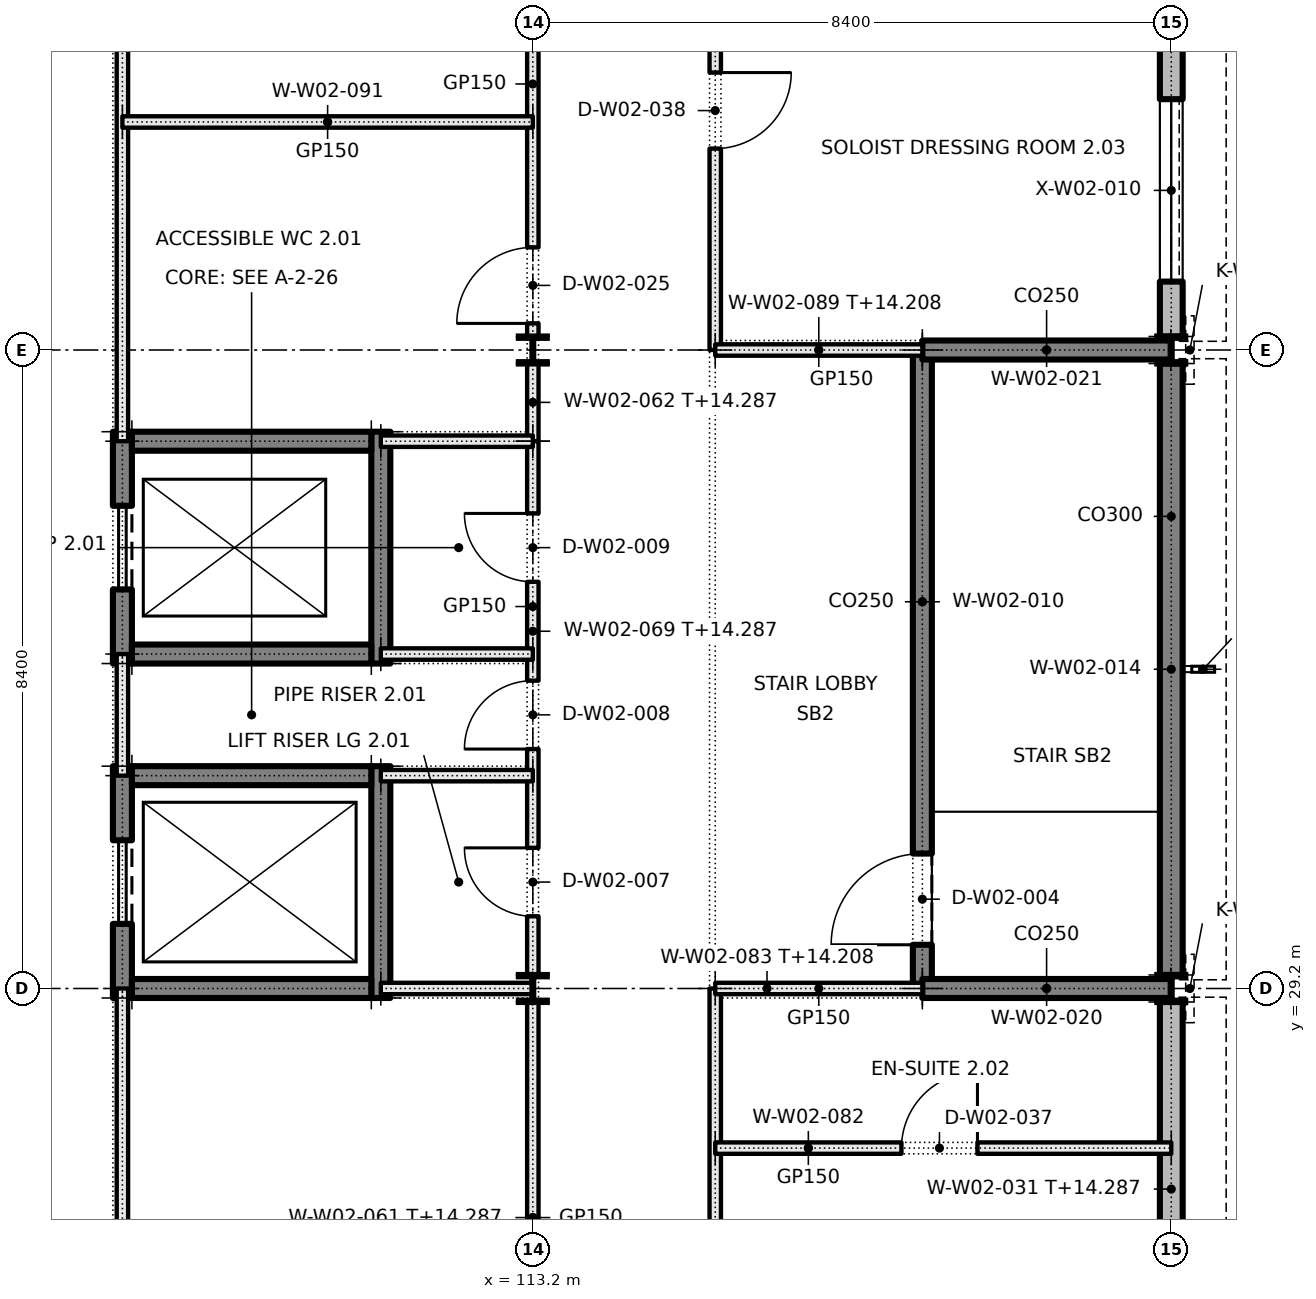
"""IFC4 building model, lengths in metres.
Left out: names, types, materials, properties, quantities, classifications, styles, units other than length and angle.
Written with IfcOpenShell. Run it as: python <this file> out.ifc"""

import sys

from ifc_helpers import new_model, si_unit, direction, frame, frame_2d, origin, origin_2d, place, context, subcontext, project, spatial, rectangle, i_section, extrude, element, fill, save


model = new_model("IFC4")
c1 = context("Model", 3, precision=1e-05, world=origin(), true_north=direction((0.0, 1.0)))
c2 = subcontext(c1, "Body", "Model", "MODEL_VIEW")
j1 = project(units=[si_unit("LENGTHUNIT", "METRE"), si_unit("PLANEANGLEUNIT", "RADIAN")], contexts=[c1])
p1 = place(None, origin())
s1 = spatial("IfcSite", under=j1, at=p1, CompositionType="ELEMENT")
p2 = place(p1, origin())
s2 = spatial("IfcBuilding", under=s1, at=p2, CompositionType="ELEMENT")
p3 = place(p2, frame((0.0, 0.0, 10.2)))
s3 = spatial("IfcBuildingStorey", under=s2, at=p3, CompositionType="ELEMENT", Elevation=10.2)
p4 = place(p3, frame((107.8, 29.075, 0.0), z_axis=(0.0, 0.0, 1.0), x_axis=(0.0, 1.0, 0.0)))
e1 = element("IfcWall", 1, at=p4, inside=s3, PredefinedType="SOLIDWALL", context=c2, shape_type="SweptSolid", body=[
    extrude(rectangle(XDim=3.05, YDim=0.25, at=frame_2d((1.525, 0.0))), origin(), (0.0, 0.0, 1.0), 4.8),
])
p5 = place(p4, frame((0.975, 0.0, 0.0)))
e2 = element("IfcOpeningElement", 2, at=p5, cuts=e1, PredefinedType="OPENING", context=c2, shape_type="SweptSolid", body=[
    extrude(rectangle(XDim=1.1, YDim=2.1, at=frame_2d((0.55, 1.05))), frame((0.0, 0.135, 0.0), z_axis=(0.0, -1.0, 0.0), x_axis=(1.0, 0.0, 0.0)), (0.0, 0.0, 1.0), 0.27),
])
p6 = place(p3, frame((111.2, 29.075, 0.0), z_axis=(0.0, 0.0, 1.0), x_axis=(0.0, 1.0, 0.0)))
e3 = element("IfcWall", 3, at=p6, inside=s3, PredefinedType="SOLIDWALL", context=c2, shape_type="SweptSolid", body=[
    extrude(rectangle(XDim=3.05, YDim=0.25, at=frame_2d((1.525, 0.0))), origin(), (0.0, 0.0, 1.0), 4.8),
])
for number, where, z_axis, x_axis in (
    (4, (107.925, 29.2, 0.0), (0.0, 0.0, 1.0), (1.0, 0.0, 0.0)),
    (5, (107.925, 32.0, 0.0), (0.0, 0.0, 1.0), (1.0, 0.0, 0.0)),
):
    element("IfcWall", number, at=place(p3, frame(where, z_axis=z_axis, x_axis=x_axis)), inside=s3, PredefinedType="SOLIDWALL", context=c2, shape_type="SweptSolid", body=[
        extrude(rectangle(XDim=3.15, YDim=0.25, at=frame_2d((1.575, 0.0))), origin(), (0.0, 0.0, 1.0), 4.8),
    ])
p7 = place(p3, frame((107.8, 33.475, 0.0), z_axis=(0.0, 0.0, 1.0), x_axis=(0.0, 1.0, 0.0)))
e6 = element("IfcWall", 6, at=p7, inside=s3, PredefinedType="SOLIDWALL", context=c2, shape_type="SweptSolid", body=[
    extrude(rectangle(XDim=3.05, YDim=0.25, at=frame_2d((1.525, 0.0))), origin(), (0.0, 0.0, 1.0), 4.8),
])
p8 = place(p7, frame((0.975, 0.0, 0.0)))
e7 = element("IfcOpeningElement", 7, at=p8, cuts=e6, PredefinedType="OPENING", context=c2, shape_type="SweptSolid", body=[
    extrude(rectangle(XDim=1.1, YDim=2.1, at=frame_2d((0.55, 1.05))), frame((0.0, 0.135, 0.0), z_axis=(0.0, -1.0, 0.0), x_axis=(1.0, 0.0, 0.0)), (0.0, 0.0, 1.0), 0.27),
])
p9 = place(p3, frame((111.2, 33.475, 0.0), z_axis=(0.0, 0.0, 1.0), x_axis=(0.0, 1.0, 0.0)))
e8 = element("IfcWall", 8, at=p9, inside=s3, PredefinedType="SOLIDWALL", context=c2, shape_type="SweptSolid", body=[
    extrude(rectangle(XDim=3.05, YDim=0.25, at=frame_2d((1.525, 0.0))), origin(), (0.0, 0.0, 1.0), 4.8),
])
for number, where, z_axis, x_axis in (
    (9, (107.925, 33.6, 0.0), (0.0, 0.0, 1.0), (1.0, 0.0, 0.0)),
    (10, (107.925, 36.4, 0.0), (0.0, 0.0, 1.0), (1.0, 0.0, 0.0)),
):
    element("IfcWall", number, at=place(p3, frame(where, z_axis=z_axis, x_axis=x_axis)), inside=s3, PredefinedType="SOLIDWALL", context=c2, shape_type="SweptSolid", body=[
        extrude(rectangle(XDim=3.15, YDim=0.25, at=frame_2d((1.575, 0.0))), origin(), (0.0, 0.0, 1.0), 4.8),
    ])
for number, where, z_axis, x_axis in (
    (11, (113.2, 29.2, 0.0), (0.0, 0.0, 1.0), (1.0, 0.0, 0.0)),
    (12, (113.2, 37.6, 0.0), (0.0, 0.0, 1.0), (1.0, 0.0, 0.0)),
    (13, (121.6, 29.2, 0.0), (0.0, 0.0, 1.0), (1.0, 0.0, 0.0)),
    (14, (121.6, 37.6, 0.0), (0.0, 0.0, 1.0), (1.0, 0.0, 0.0)),
):
    element("IfcColumn", number, at=place(p3, frame(where, z_axis=z_axis, x_axis=x_axis)), inside=s3, PredefinedType="COLUMN", context=c2, shape_type="SweptSolid", body=[
        extrude(i_section(OverallWidth=0.368, OverallDepth=0.356, WebThickness=0.011, FlangeThickness=0.018, FilletRadius=0.015, at=origin_2d()), origin(), (0.0, 0.0, 1.0), 4.8),
    ])
p10 = place(p3, frame((118.325, 29.2, 0.0), z_axis=(0.0, 0.0, 1.0), x_axis=(0.0, 1.0, 0.0)))
e15 = element("IfcWall", 15, at=p10, inside=s3, PredefinedType="SHEAR", context=c2, shape_type="SweptSolid", body=[
    extrude(rectangle(XDim=8.4, YDim=0.25, at=frame_2d((4.2, 0.0))), origin(), (0.0, 0.0, 1.0), 4.8),
])
p11 = place(p10, frame((0.575, 0.0, 0.0)))
e16 = element("IfcOpeningElement", 16, at=p11, cuts=e15, PredefinedType="OPENING", context=c2, shape_type="SweptSolid", body=[
    extrude(rectangle(XDim=1.2, YDim=2.1, at=frame_2d((0.6, 1.05))), frame((0.0, 0.135, 0.0), z_axis=(0.0, -1.0, 0.0), x_axis=(1.0, 0.0, 0.0)), (0.0, 0.0, 1.0), 0.27),
])
p12 = place(p3, frame((121.6, 29.378, 0.0), z_axis=(0.0, 0.0, 1.0), x_axis=(0.0, 1.0, 0.0)))
e17 = element("IfcWall", 17, at=p12, inside=s3, PredefinedType="SHEAR", context=c2, shape_type="SweptSolid", body=[
    extrude(rectangle(XDim=8.044, YDim=0.3, at=frame_2d((4.022, 0.0))), origin(), (0.0, 0.0, 1.0), 4.8),
])
for number, where, z_axis, x_axis in (
    (18, (118.325, 29.2, 0.0), (0.0, 0.0, 1.0), (1.0, 0.0, 0.0)),
    (19, (118.325, 37.6, 0.0), (0.0, 0.0, 1.0), (1.0, 0.0, 0.0)),
):
    element("IfcWall", number, at=place(p3, frame(where, z_axis=z_axis, x_axis=x_axis)), inside=s3, PredefinedType="SHEAR", context=c2, shape_type="SweptSolid", body=[
        extrude(rectangle(XDim=3.27, YDim=0.25, at=frame_2d((1.635, 0.0))), origin(), (0.0, 0.0, 1.0), 4.8),
    ])
p13 = place(p3, frame((121.6, 20.978, 0.0), z_axis=(0.0, 0.0, 1.0), x_axis=(0.0, 1.0, 0.0)))
e20 = element("IfcWall", 20, at=p13, inside=s3, PredefinedType="SOLIDWALL", context=c2, shape_type="SweptSolid", body=[
    extrude(rectangle(XDim=8.044, YDim=0.3, at=frame_2d((4.022, 0.0))), origin(), (0.0, 0.0, 1.0), 4.087),
])
p14 = place(p13, frame((0.722, 0.0, 0.95)))
e21 = element("IfcOpeningElement", 21, at=p14, cuts=e20, PredefinedType="OPENING", context=c2, shape_type="SweptSolid", body=[
    extrude(rectangle(XDim=2.4, YDim=1.8, at=frame_2d((1.2, 0.9))), frame((0.0, 0.16, 0.0), z_axis=(0.0, -1.0, 0.0), x_axis=(1.0, 0.0, 0.0)), (0.0, 0.0, 1.0), 0.32),
])
p15 = place(p3, frame((121.6, 37.778, 0.0), z_axis=(0.0, 0.0, 1.0), x_axis=(0.0, 1.0, 0.0)))
e22 = element("IfcWall", 22, at=p15, inside=s3, PredefinedType="SOLIDWALL", context=c2, shape_type="SweptSolid", body=[
    extrude(rectangle(XDim=8.044, YDim=0.3, at=frame_2d((4.022, 0.0))), origin(), (0.0, 0.0, 1.0), 4.087),
])
p16 = place(p15, frame((0.722, 0.0, 0.95)))
e23 = element("IfcOpeningElement", 23, at=p16, cuts=e22, PredefinedType="OPENING", context=c2, shape_type="SweptSolid", body=[
    extrude(rectangle(XDim=2.4, YDim=1.8, at=frame_2d((1.2, 0.9))), frame((0.0, 0.16, 0.0), z_axis=(0.0, -1.0, 0.0), x_axis=(1.0, 0.0, 0.0)), (0.0, 0.0, 1.0), 0.32),
])
p17 = place(p3, frame((107.8, 4.0, 0.0), z_axis=(0.0, 0.0, 1.0), x_axis=(0.0, 1.0, 0.0)))
e24 = element("IfcWall", 24, at=p17, inside=s3, PredefinedType="PARTITIONING", context=c2, shape_type="SweptSolid", body=[
    extrude(rectangle(XDim=25.2, YDim=0.15, at=frame_2d((12.6, 0.0))), origin(), (0.0, 0.0, 1.0), 4.8),
])
p18 = place(p3, frame((107.8, 36.4, 0.0), z_axis=(0.0, 0.0, 1.0), x_axis=(0.0, 1.0, 0.0)))
e25 = element("IfcWall", 25, at=p18, inside=s3, PredefinedType="PARTITIONING", context=c2, shape_type="SweptSolid", body=[
    extrude(rectangle(XDim=42.0, YDim=0.15, at=frame_2d((21.0, 0.0))), origin(), (0.0, 0.0, 1.0), 4.8),
])
p19 = place(p3, frame((107.8, 32.0, 0.0), z_axis=(0.0, 0.0, 1.0), x_axis=(0.0, 1.0, 0.0)))
e26 = element("IfcWall", 26, at=p19, inside=s3, PredefinedType="PARTITIONING", context=c2, shape_type="SweptSolid", body=[
    extrude(rectangle(XDim=1.6, YDim=0.15, at=frame_2d((0.8, 0.0))), origin(), (0.0, 0.0, 1.0), 4.8),
])
p20 = place(p3, frame((113.2, 20.978, 0.0), z_axis=(0.0, 0.0, 1.0), x_axis=(0.0, 1.0, 0.0)))
e27 = element("IfcWall", 27, at=p20, inside=s3, PredefinedType="PARTITIONING", context=c2, shape_type="SweptSolid", body=[
    extrude(rectangle(XDim=8.044, YDim=0.15, at=frame_2d((4.022, 0.0))), origin(), (0.0, 0.0, 1.0), 4.087),
])
p21 = place(p20, frame((1.372, 0.0, 0.0)))
e28 = element("IfcOpeningElement", 28, at=p21, cuts=e27, PredefinedType="OPENING", context=c2, shape_type="SweptSolid", body=[
    extrude(rectangle(XDim=1.0, YDim=2.1, at=frame_2d((0.5, 1.05))), frame((0.0, 0.085, 0.0), z_axis=(0.0, -1.0, 0.0), x_axis=(1.0, 0.0, 0.0)), (0.0, 0.0, 1.0), 0.17),
])
p22 = place(p3, frame((113.2, 36.4, 0.0), z_axis=(0.0, 0.0, 1.0), x_axis=(0.0, 1.0, 0.0)))
e29 = element("IfcWall", 29, at=p22, inside=s3, PredefinedType="PARTITIONING", context=c2, shape_type="SweptSolid", body=[
    extrude(rectangle(XDim=1.022, YDim=0.15, at=frame_2d((0.511, 0.0))), origin(), (0.0, 0.0, 1.0), 4.087),
])
p23 = place(p3, frame((113.2, 37.778, 0.0), z_axis=(0.0, 0.0, 1.0), x_axis=(0.0, 1.0, 0.0)))
e30 = element("IfcWall", 30, at=p23, inside=s3, PredefinedType="PARTITIONING", context=c2, shape_type="SweptSolid", body=[
    extrude(rectangle(XDim=8.044, YDim=0.15, at=frame_2d((4.022, 0.0))), origin(), (0.0, 0.0, 1.0), 4.087),
])
p24 = place(p23, frame((0.172, 0.0, 0.0)))
e31 = element("IfcOpeningElement", 31, at=p24, cuts=e30, PredefinedType="OPENING", context=c2, shape_type="SweptSolid", body=[
    extrude(rectangle(XDim=1.0, YDim=2.1, at=frame_2d((0.5, 1.05))), frame((0.0, 0.085, 0.0), z_axis=(0.0, -1.0, 0.0), x_axis=(1.0, 0.0, 0.0)), (0.0, 0.0, 1.0), 0.17),
])
p25 = place(p23, frame((5.472, 0.0, 0.0)))
e32 = element("IfcOpeningElement", 32, at=p25, cuts=e30, PredefinedType="OPENING", context=c2, shape_type="SweptSolid", body=[
    extrude(rectangle(XDim=1.0, YDim=2.1, at=frame_2d((0.5, 1.05))), frame((0.0, 0.085, 0.0), z_axis=(0.0, -1.0, 0.0), x_axis=(1.0, 0.0, 0.0)), (0.0, 0.0, 1.0), 0.17),
])
p26 = place(p3, frame((113.2, 29.378, 0.0), z_axis=(0.0, 0.0, 1.0), x_axis=(0.0, 1.0, 0.0)))
e33 = element("IfcWall", 33, at=p26, inside=s3, PredefinedType="PARTITIONING", context=c2, shape_type="SweptSolid", body=[
    extrude(rectangle(XDim=7.022, YDim=0.15, at=frame_2d((3.511, 0.0))), origin(), (0.0, 0.0, 1.0), 4.087),
])
p27 = place(p26, frame((0.772, 0.0, 0.0)))
e34 = element("IfcOpeningElement", 34, at=p27, cuts=e33, PredefinedType="OPENING", context=c2, shape_type="SweptSolid", body=[
    extrude(rectangle(XDim=0.9, YDim=2.1, at=frame_2d((0.45, 1.05))), frame((0.0, 0.085, 0.0), z_axis=(0.0, -1.0, 0.0), x_axis=(1.0, 0.0, 0.0)), (0.0, 0.0, 1.0), 0.17),
])
p28 = place(p26, frame((2.972, 0.0, 0.0)))
e35 = element("IfcOpeningElement", 35, at=p28, cuts=e33, PredefinedType="OPENING", context=c2, shape_type="SweptSolid", body=[
    extrude(rectangle(XDim=0.9, YDim=2.1, at=frame_2d((0.45, 1.05))), frame((0.0, 0.085, 0.0), z_axis=(0.0, -1.0, 0.0), x_axis=(1.0, 0.0, 0.0)), (0.0, 0.0, 1.0), 0.17),
])
p29 = place(p26, frame((5.172, 0.0, 0.0)))
e36 = element("IfcOpeningElement", 36, at=p29, cuts=e33, PredefinedType="OPENING", context=c2, shape_type="SweptSolid", body=[
    extrude(rectangle(XDim=0.9, YDim=2.1, at=frame_2d((0.45, 1.05))), frame((0.0, 0.085, 0.0), z_axis=(0.0, -1.0, 0.0), x_axis=(1.0, 0.0, 0.0)), (0.0, 0.0, 1.0), 0.17),
])
p30 = place(p3, frame((115.6, 12.4, 0.0), z_axis=(0.0, 0.0, 1.0), x_axis=(0.0, 1.0, 0.0)))
e37 = element("IfcWall", 37, at=p30, inside=s3, PredefinedType="PARTITIONING", context=c2, shape_type="SweptSolid", body=[
    extrude(rectangle(XDim=16.8, YDim=0.15, at=frame_2d((8.4, 0.0))), origin(), (0.0, 0.0, 1.0), 4.8),
])
p31 = place(p30, frame((2.65, 0.0, 0.0)))
e38 = element("IfcOpeningElement", 38, at=p31, cuts=e37, PredefinedType="OPENING", context=c2, shape_type="SweptSolid", body=[
    extrude(rectangle(XDim=1.0, YDim=2.1, at=frame_2d((0.5, 1.05))), frame((0.0, 0.085, 0.0), z_axis=(0.0, -1.0, 0.0), x_axis=(1.0, 0.0, 0.0)), (0.0, 0.0, 1.0), 0.17),
])
p32 = place(p30, frame((11.05, 0.0, 0.0)))
e39 = element("IfcOpeningElement", 39, at=p32, cuts=e37, PredefinedType="OPENING", context=c2, shape_type="SweptSolid", body=[
    extrude(rectangle(XDim=1.0, YDim=2.1, at=frame_2d((0.5, 1.05))), frame((0.0, 0.085, 0.0), z_axis=(0.0, -1.0, 0.0), x_axis=(1.0, 0.0, 0.0)), (0.0, 0.0, 1.0), 0.17),
])
p33 = place(p3, frame((115.6, 37.6, 0.0), z_axis=(0.0, 0.0, 1.0), x_axis=(0.0, 1.0, 0.0)))
e40 = element("IfcWall", 40, at=p33, inside=s3, PredefinedType="PARTITIONING", context=c2, shape_type="SweptSolid", body=[
    extrude(rectangle(XDim=21.0, YDim=0.15, at=frame_2d((10.5, 0.0))), origin(), (0.0, 0.0, 1.0), 4.8),
])
p34 = place(p33, frame((2.65, 0.0, 0.0)))
e41 = element("IfcOpeningElement", 41, at=p34, cuts=e40, PredefinedType="OPENING", context=c2, shape_type="SweptSolid", body=[
    extrude(rectangle(XDim=1.0, YDim=2.1, at=frame_2d((0.5, 1.05))), frame((0.0, 0.085, 0.0), z_axis=(0.0, -1.0, 0.0), x_axis=(1.0, 0.0, 0.0)), (0.0, 0.0, 1.0), 0.17),
])
p35 = place(p33, frame((11.05, 0.0, 0.0)))
e42 = element("IfcOpeningElement", 42, at=p35, cuts=e40, PredefinedType="OPENING", context=c2, shape_type="SweptSolid", body=[
    extrude(rectangle(XDim=1.0, YDim=2.1, at=frame_2d((0.5, 1.05))), frame((0.0, 0.085, 0.0), z_axis=(0.0, -1.0, 0.0), x_axis=(1.0, 0.0, 0.0)), (0.0, 0.0, 1.0), 0.17),
])
p36 = place(p33, frame((18.35, 0.0, 0.0)))
e43 = element("IfcOpeningElement", 43, at=p36, cuts=e40, PredefinedType="OPENING", context=c2, shape_type="SweptSolid", body=[
    extrude(rectangle(XDim=1.0, YDim=2.1, at=frame_2d((0.5, 1.05))), frame((0.0, 0.085, 0.0), z_axis=(0.0, -1.0, 0.0), x_axis=(1.0, 0.0, 0.0)), (0.0, 0.0, 1.0), 0.17),
])
p37 = place(p3, frame((115.6, 27.1, 0.0), z_axis=(0.0, 0.0, 1.0), x_axis=(1.0, 0.0, 0.0)))
e44 = element("IfcWall", 44, at=p37, inside=s3, PredefinedType="PARTITIONING", context=c2, shape_type="SweptSolid", body=[
    extrude(rectangle(XDim=6.0, YDim=0.15, at=frame_2d((3.0, 0.0))), origin(), (0.0, 0.0, 1.0), 4.8),
])
p38 = place(p37, frame((2.45, 0.0, 0.0)))
e45 = element("IfcOpeningElement", 45, at=p38, cuts=e44, PredefinedType="OPENING", context=c2, shape_type="SweptSolid", body=[
    extrude(rectangle(XDim=1.0, YDim=2.1, at=frame_2d((0.5, 1.05))), frame((0.0, 0.085, 0.0), z_axis=(0.0, -1.0, 0.0), x_axis=(1.0, 0.0, 0.0)), (0.0, 0.0, 1.0), 0.17),
])
p39 = place(p3, frame((115.6, 29.2, 0.0), z_axis=(0.0, 0.0, 1.0), x_axis=(1.0, 0.0, 0.0)))
e46 = element("IfcWall", 46, at=p39, inside=s3, PredefinedType="PARTITIONING", context=c2, shape_type="SweptSolid", body=[
    extrude(rectangle(XDim=2.725, YDim=0.15, at=frame_2d((1.362, 0.0))), origin(), (0.0, 0.0, 1.0), 4.008),
])
p40 = place(p3, frame((111.2, 29.2, 0.0), z_axis=(0.0, 0.0, 1.0), x_axis=(1.0, 0.0, 0.0)))
e47 = element("IfcWall", 47, at=p40, inside=s3, PredefinedType="PARTITIONING", context=c2, shape_type="SweptSolid", body=[
    extrude(rectangle(XDim=1.994, YDim=0.15, at=frame_2d((0.997, 0.0))), origin(), (0.0, 0.0, 1.0), 4.008),
])
for number, where, z_axis, x_axis in (
    (48, (111.2, 32.0, 0.0), (0.0, 0.0, 1.0), (1.0, 0.0, 0.0)),
    (49, (111.2, 33.6, 0.0), (0.0, 0.0, 1.0), (1.0, 0.0, 0.0)),
    (50, (111.2, 36.4, 0.0), (0.0, 0.0, 1.0), (1.0, 0.0, 0.0)),
):
    element("IfcWall", number, at=place(p3, frame(where, z_axis=z_axis, x_axis=x_axis)), inside=s3, PredefinedType="PARTITIONING", context=c2, shape_type="SweptSolid", body=[
        extrude(rectangle(XDim=2.0, YDim=0.15, at=frame_2d((1.0, 0.0))), origin(), (0.0, 0.0, 1.0), 4.8),
    ])
p41 = place(p3, frame((115.6, 37.6, 0.0), z_axis=(0.0, 0.0, 1.0), x_axis=(1.0, 0.0, 0.0)))
e51 = element("IfcWall", 51, at=p41, inside=s3, PredefinedType="PARTITIONING", context=c2, shape_type="SweptSolid", body=[
    extrude(rectangle(XDim=2.725, YDim=0.15, at=frame_2d((1.362, 0.0))), origin(), (0.0, 0.0, 1.0), 4.008),
])
p42 = place(p3, frame((107.8, 40.6, 0.0), z_axis=(0.0, 0.0, 1.0), x_axis=(1.0, 0.0, 0.0)))
e52 = element("IfcWall", 52, at=p42, inside=s3, PredefinedType="PARTITIONING", context=c2, shape_type="SweptSolid", body=[
    extrude(rectangle(XDim=5.4, YDim=0.15, at=frame_2d((2.7, 0.0))), origin(), (0.0, 0.0, 1.0), 4.8),
])
p43 = place(p5, origin())
e53 = element("IfcDoor", 53, at=p43, inside=s3, OperationType="SLIDING_TO_LEFT", PredefinedType="DOOR", context=c2, shape_type="SweptSolid", body=[
    extrude(rectangle(XDim=1.1, YDim=2.1, at=frame_2d((0.55, 1.05))), frame((0.0, 0.025, 0.0), z_axis=(0.0, -1.0, 0.0), x_axis=(1.0, 0.0, 0.0)), (0.0, 0.0, 1.0), 0.05),
])
fill(e2, e53)
p44 = place(p8, origin())
e54 = element("IfcDoor", 54, at=p44, inside=s3, OperationType="SLIDING_TO_LEFT", PredefinedType="DOOR", context=c2, shape_type="SweptSolid", body=[
    extrude(rectangle(XDim=1.1, YDim=2.1, at=frame_2d((0.55, 1.05))), frame((0.0, 0.025, 0.0), z_axis=(0.0, -1.0, 0.0), x_axis=(1.0, 0.0, 0.0)), (0.0, 0.0, 1.0), 0.05),
])
fill(e7, e54)
p45 = place(p16, origin())
e55 = element("IfcWindow", 55, at=p45, inside=s3, PartitioningType="DOUBLE_PANEL_VERTICAL", PredefinedType="WINDOW", context=c2, shape_type="SweptSolid", body=[
    extrude(rectangle(XDim=2.4, YDim=1.8, at=frame_2d((1.2, 0.9))), frame((0.0, 0.03, 0.0), z_axis=(0.0, -1.0, 0.0), x_axis=(1.0, 0.0, 0.0)), (0.0, 0.0, 1.0), 0.06),
])
fill(e23, e55)
p46 = place(p11, origin())
e56 = element("IfcDoor", 56, at=p46, inside=s3, OperationType="SINGLE_SWING_LEFT", PredefinedType="DOOR", context=c2, shape_type="SweptSolid", body=[
    extrude(rectangle(XDim=1.2, YDim=2.1, at=frame_2d((0.6, 1.05))), frame((0.0, 0.025, 0.0), z_axis=(0.0, -1.0, 0.0), x_axis=(1.0, 0.0, 0.0)), (0.0, 0.0, 1.0), 0.05),
])
fill(e16, e56)
p47 = place(p27, origin())
e57 = element("IfcDoor", 57, at=p47, inside=s3, OperationType="SINGLE_SWING_RIGHT", PredefinedType="DOOR", context=c2, shape_type="SweptSolid", body=[
    extrude(rectangle(XDim=0.9, YDim=2.1, at=frame_2d((0.45, 1.05))), frame((0.0, 0.025, 0.0), z_axis=(0.0, -1.0, 0.0), x_axis=(1.0, 0.0, 0.0)), (0.0, 0.0, 1.0), 0.05),
])
fill(e34, e57)
p48 = place(p28, origin())
e58 = element("IfcDoor", 58, at=p48, inside=s3, OperationType="SINGLE_SWING_LEFT", PredefinedType="DOOR", context=c2, shape_type="SweptSolid", body=[
    extrude(rectangle(XDim=0.9, YDim=2.1, at=frame_2d((0.45, 1.05))), frame((0.0, 0.025, 0.0), z_axis=(0.0, -1.0, 0.0), x_axis=(1.0, 0.0, 0.0)), (0.0, 0.0, 1.0), 0.05),
])
fill(e35, e58)
p49 = place(p29, origin())
e59 = element("IfcDoor", 59, at=p49, inside=s3, OperationType="SINGLE_SWING_RIGHT", PredefinedType="DOOR", context=c2, shape_type="SweptSolid", body=[
    extrude(rectangle(XDim=0.9, YDim=2.1, at=frame_2d((0.45, 1.05))), frame((0.0, 0.025, 0.0), z_axis=(0.0, -1.0, 0.0), x_axis=(1.0, 0.0, 0.0)), (0.0, 0.0, 1.0), 0.05),
])
fill(e36, e59)
p50 = place(p24, origin())
e60 = element("IfcDoor", 60, at=p50, inside=s3, OperationType="SINGLE_SWING_LEFT", PredefinedType="DOOR", context=c2, shape_type="SweptSolid", body=[
    extrude(rectangle(XDim=1.0, YDim=2.1, at=frame_2d((0.5, 1.05))), frame((0.0, 0.025, 0.0), z_axis=(0.0, -1.0, 0.0), x_axis=(1.0, 0.0, 0.0)), (0.0, 0.0, 1.0), 0.05),
])
fill(e31, e60)
p51 = place(p38, origin())
e61 = element("IfcDoor", 61, at=p51, inside=s3, OperationType="SINGLE_SWING_RIGHT", PredefinedType="DOOR", context=c2, shape_type="SweptSolid", body=[
    extrude(rectangle(XDim=1.0, YDim=2.1, at=frame_2d((0.5, 1.05))), frame((0.0, 0.025, 0.0), z_axis=(0.0, -1.0, 0.0), x_axis=(1.0, 0.0, 0.0)), (0.0, 0.0, 1.0), 0.05),
])
fill(e45, e61)
p52 = place(p34, frame((1.0, 0.0, 0.0), z_axis=(0.0, 0.0, 1.0), x_axis=(-1.0, 0.0, 0.0)))
e62 = element("IfcDoor", 62, at=p52, inside=s3, OperationType="SINGLE_SWING_LEFT", PredefinedType="DOOR", context=c2, shape_type="SweptSolid", body=[
    extrude(rectangle(XDim=1.0, YDim=2.1, at=frame_2d((0.5, 1.05))), frame((0.0, 0.025, 0.0), z_axis=(0.0, -1.0, 0.0), x_axis=(1.0, 0.0, 0.0)), (0.0, 0.0, 1.0), 0.05),
])
fill(e41, e62)
save(model, sys.argv[1])
